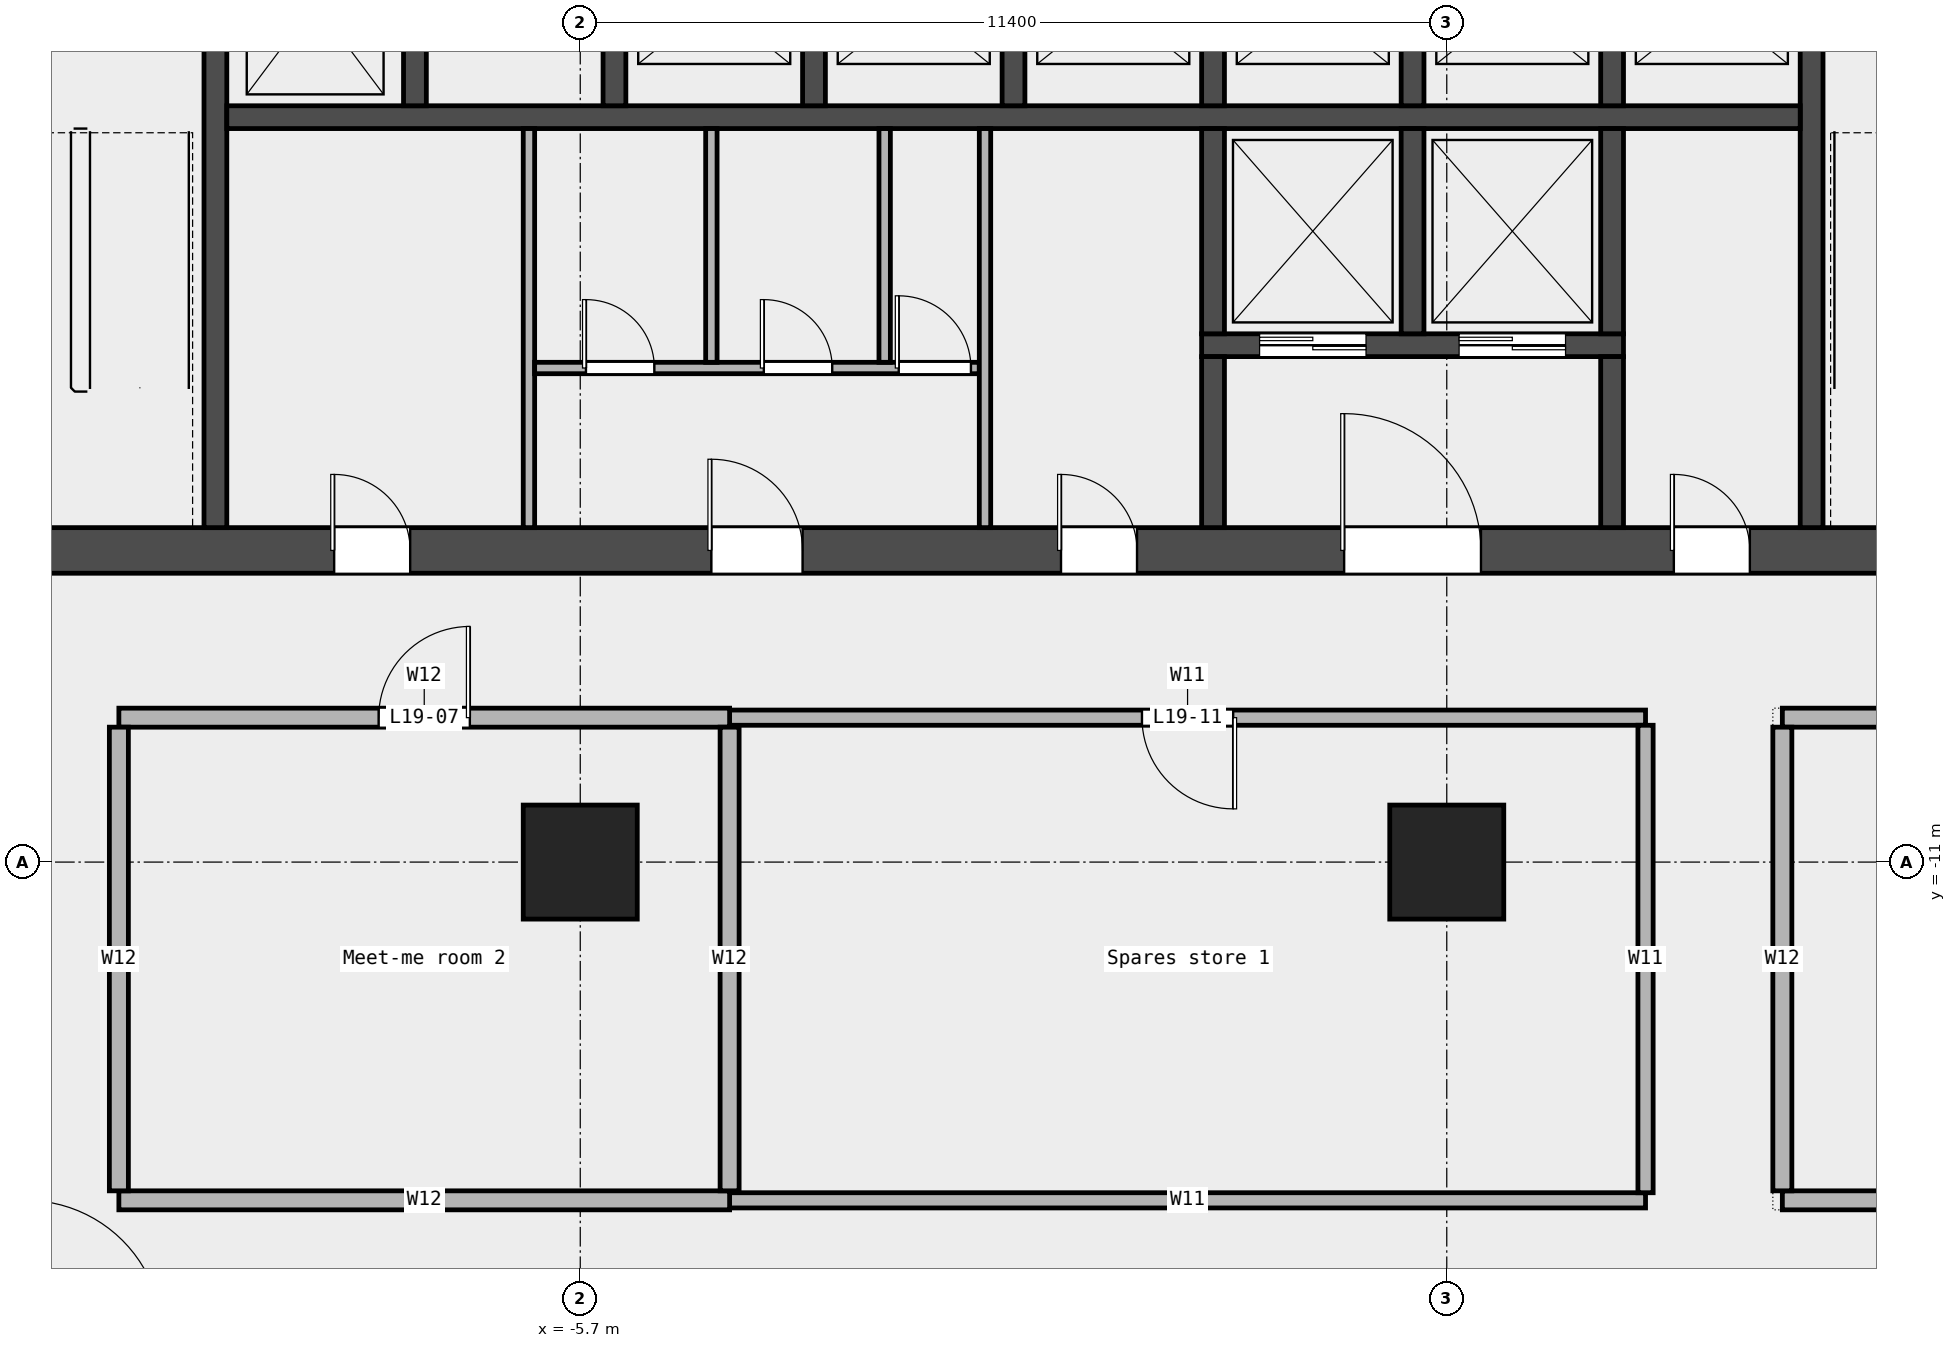
"""IFC4 building model, lengths in metres.
Left out: names, types, materials, properties, quantities, classifications, styles, units other than length and angle.
Written with IfcOpenShell. Run it as: python <this file> out.ifc"""

import sys

from ifc_helpers import new_model, si_unit, direction, frame, frame_2d, origin, origin_2d, place, context, subcontext, project, spatial, rectangle, extrude, element, fill, save


model = new_model("IFC4")
c1 = context("Model", 3, precision=1e-05, world=origin(), true_north=direction((0.0, 1.0)))
c2 = subcontext(c1, "Body", "Model", "MODEL_VIEW")
j1 = project(units=[si_unit("LENGTHUNIT", "METRE"), si_unit("PLANEANGLEUNIT", "RADIAN")], contexts=[c1])
p1 = place(None, origin())
s1 = spatial("IfcSite", under=j1, at=p1, CompositionType="ELEMENT")
p2 = place(p1, origin())
s2 = spatial("IfcBuilding", under=s1, at=p2, CompositionType="ELEMENT")
p3 = place(p2, frame((0.0, 0.0, 99.1)))
s3 = spatial("IfcBuildingStorey", under=s2, at=p3, CompositionType="ELEMENT", Elevation=99.1)
for number, where, z_axis, x_axis in (
    (1, (-5.7, -11.0, 0.0), (0.0, 0.0, 1.0), (1.0, 0.0, 0.0)),
    (2, (5.7, -11.0, 0.0), (0.0, 0.0, 1.0), (1.0, 0.0, 0.0)),
):
    element("IfcColumn", number, at=place(p3, frame(where, z_axis=z_axis, x_axis=x_axis)), inside=s3, PredefinedType="COLUMN", context=c2, shape_type="SweptSolid", body=[
        extrude(rectangle(XDim=1.5, YDim=1.5, at=origin_2d()), origin(), (0.0, 0.0, 1.0), 4.05),
    ])
p4 = place(p3, frame((-3.735, -15.45, 0.0), z_axis=(0.0, 0.0, 1.0), x_axis=(1.0, 0.0, 0.0)))
e3 = element("IfcWall", 3, at=p4, inside=s3, PredefinedType="PARTITIONING", context=c2, shape_type="SweptSolid", body=[
    extrude(rectangle(XDim=12.05, YDim=0.2, at=frame_2d((6.025, 0.0))), origin(), (0.0, 0.0, 1.0), 4.05),
])
p5 = place(p3, frame((-11.77, -15.45, 0.0), z_axis=(0.0, 0.0, 1.0), x_axis=(1.0, 0.0, 0.0)))
e4 = element("IfcWall", 4, at=p5, inside=s3, PredefinedType="PARTITIONING", context=c2, shape_type="SweptSolid", body=[
    extrude(rectangle(XDim=8.035, YDim=0.25, at=frame_2d((4.018, 0.0))), origin(), (0.0, 0.0, 1.0), 4.05),
])
p6 = place(p3, frame((10.115, -15.45, 0.0), z_axis=(0.0, 0.0, 1.0), x_axis=(1.0, 0.0, 0.0)))
e5 = element("IfcWall", 5, at=p6, inside=s3, PredefinedType="PARTITIONING", context=c2, shape_type="SweptSolid", body=[
    extrude(rectangle(XDim=18.885, YDim=0.25, at=frame_2d((9.442, 0.0))), origin(), (0.0, 0.0, 1.0), 4.05),
])
p7 = place(p6, frame((8.742, 0.0, 0.0)))
e6 = element("IfcOpeningElement", 6, at=p7, cuts=e5, PredefinedType="OPENING", context=c2, shape_type="SweptSolid", body=[
    extrude(rectangle(XDim=1.2, YDim=2.1, at=frame_2d((0.6, 1.05))), frame((0.0, 0.137, 0.0), z_axis=(0.0, -1.0, 0.0), x_axis=(1.0, 0.0, 0.0)), (0.0, 0.0, 1.0), 0.274),
])
p8 = place(p3, frame((-3.735, -9.1, 0.0), z_axis=(0.0, 0.0, 1.0), x_axis=(1.0, 0.0, 0.0)))
e7 = element("IfcWall", 7, at=p8, inside=s3, PredefinedType="PARTITIONING", context=c2, shape_type="SweptSolid", body=[
    extrude(rectangle(XDim=12.05, YDim=0.2, at=frame_2d((6.025, 0.0))), origin(), (0.0, 0.0, 1.0), 4.05),
])
p9 = place(p8, frame((5.425, 0.0, 0.0)))
e8 = element("IfcOpeningElement", 8, at=p9, cuts=e7, PredefinedType="OPENING", context=c2, shape_type="SweptSolid", body=[
    extrude(rectangle(XDim=1.2, YDim=2.1, at=frame_2d((0.6, 1.05))), frame((0.0, 0.112, 0.0), z_axis=(0.0, -1.0, 0.0), x_axis=(1.0, 0.0, 0.0)), (0.0, 0.0, 1.0), 0.224),
])
p10 = place(p3, frame((-11.77, -9.1, 0.0), z_axis=(0.0, 0.0, 1.0), x_axis=(1.0, 0.0, 0.0)))
e9 = element("IfcWall", 9, at=p10, inside=s3, PredefinedType="PARTITIONING", context=c2, shape_type="SweptSolid", body=[
    extrude(rectangle(XDim=8.035, YDim=0.25, at=frame_2d((4.018, 0.0))), origin(), (0.0, 0.0, 1.0), 4.05),
])
p11 = place(p10, frame((3.417, 0.0, 0.0)))
e10 = element("IfcOpeningElement", 10, at=p11, cuts=e9, PredefinedType="OPENING", context=c2, shape_type="SweptSolid", body=[
    extrude(rectangle(XDim=1.2, YDim=2.1, at=frame_2d((0.6, 1.05))), frame((0.0, 0.137, 0.0), z_axis=(0.0, -1.0, 0.0), x_axis=(1.0, 0.0, 0.0)), (0.0, 0.0, 1.0), 0.274),
])
p12 = place(p3, frame((10.115, -9.1, 0.0), z_axis=(0.0, 0.0, 1.0), x_axis=(1.0, 0.0, 0.0)))
e11 = element("IfcWall", 11, at=p12, inside=s3, PredefinedType="PARTITIONING", context=c2, shape_type="SweptSolid", body=[
    extrude(rectangle(XDim=18.885, YDim=0.25, at=frame_2d((9.442, 0.0))), origin(), (0.0, 0.0, 1.0), 4.05),
])
for number, where, z_axis, x_axis in (
    (12, (-11.77, -15.325, 0.0), (0.0, 0.0, 1.0), (0.0, 1.0, 0.0)),
    (13, (-3.735, -15.325, 0.0), (0.0, 0.0, 1.0), (0.0, 1.0, 0.0)),
):
    element("IfcWall", number, at=place(p3, frame(where, z_axis=z_axis, x_axis=x_axis)), inside=s3, PredefinedType="PARTITIONING", context=c2, shape_type="SweptSolid", body=[
        extrude(rectangle(XDim=6.1, YDim=0.25, at=frame_2d((3.05, 0.0))), origin(), (0.0, 0.0, 1.0), 4.05),
    ])
p13 = place(p3, frame((8.315, -15.35, 0.0), z_axis=(0.0, 0.0, 1.0), x_axis=(0.0, 1.0, 0.0)))
e14 = element("IfcWall", 14, at=p13, inside=s3, PredefinedType="PARTITIONING", context=c2, shape_type="SweptSolid", body=[
    extrude(rectangle(XDim=6.15, YDim=0.2, at=frame_2d((3.075, 0.0))), origin(), (0.0, 0.0, 1.0), 4.05),
])
p14 = place(p3, frame((10.115, -15.325, 0.0), z_axis=(0.0, 0.0, 1.0), x_axis=(0.0, 1.0, 0.0)))
e15 = element("IfcWall", 15, at=p14, inside=s3, PredefinedType="PARTITIONING", context=c2, shape_type="SweptSolid", body=[
    extrude(rectangle(XDim=6.1, YDim=0.25, at=frame_2d((3.05, 0.0))), origin(), (0.0, 0.0, 1.0), 4.05),
])
p15 = place(p3, frame((-14.4, -6.9, 0.0), z_axis=(0.0, 0.0, 1.0), x_axis=(1.0, 0.0, 0.0)))
e16 = element("IfcWall", 16, at=p15, inside=s3, PredefinedType="SHEAR", context=c2, shape_type="SweptSolid", body=[
    extrude(rectangle(XDim=28.8, YDim=0.6, at=frame_2d((14.4, 0.0))), origin(), (0.0, 0.0, 1.0), 4.2),
])
p16 = place(p15, frame((5.462, 0.0, 0.0)))
e17 = element("IfcOpeningElement", 17, at=p16, cuts=e16, PredefinedType="OPENING", context=c2, shape_type="SweptSolid", body=[
    extrude(rectangle(XDim=1.0, YDim=2.1, at=frame_2d((0.5, 1.05))), frame((0.0, 0.312, 0.0), z_axis=(0.0, -1.0, 0.0), x_axis=(1.0, 0.0, 0.0)), (0.0, 0.0, 1.0), 0.624),
])
p17 = place(p15, frame((10.425, 0.0, 0.0)))
e18 = element("IfcOpeningElement", 18, at=p17, cuts=e16, PredefinedType="OPENING", context=c2, shape_type="SweptSolid", body=[
    extrude(rectangle(XDim=1.2, YDim=2.1, at=frame_2d((0.6, 1.05))), frame((0.0, 0.312, 0.0), z_axis=(0.0, -1.0, 0.0), x_axis=(1.0, 0.0, 0.0)), (0.0, 0.0, 1.0), 0.624),
])
p18 = place(p15, frame((15.025, 0.0, 0.0)))
e19 = element("IfcOpeningElement", 19, at=p18, cuts=e16, PredefinedType="OPENING", context=c2, shape_type="SweptSolid", body=[
    extrude(rectangle(XDim=1.0, YDim=2.1, at=frame_2d((0.5, 1.05))), frame((0.0, 0.312, 0.0), z_axis=(0.0, -1.0, 0.0), x_axis=(1.0, 0.0, 0.0)), (0.0, 0.0, 1.0), 0.624),
])
p19 = place(p15, frame((18.75, 0.0, 0.0)))
e20 = element("IfcOpeningElement", 20, at=p19, cuts=e16, PredefinedType="OPENING", context=c2, shape_type="SweptSolid", body=[
    extrude(rectangle(XDim=1.8, YDim=2.1, at=frame_2d((0.9, 1.05))), frame((0.0, 0.312, 0.0), z_axis=(0.0, -1.0, 0.0), x_axis=(1.0, 0.0, 0.0)), (0.0, 0.0, 1.0), 0.624),
])
p20 = place(p15, frame((23.087, 0.0, 0.0)))
e21 = element("IfcOpeningElement", 21, at=p20, cuts=e16, PredefinedType="OPENING", context=c2, shape_type="SweptSolid", body=[
    extrude(rectangle(XDim=1.0, YDim=2.1, at=frame_2d((0.5, 1.05))), frame((0.0, 0.312, 0.0), z_axis=(0.0, -1.0, 0.0), x_axis=(1.0, 0.0, 0.0)), (0.0, 0.0, 1.0), 0.624),
])
for number, where, z_axis, x_axis in (
    (22, (-10.5, -6.6, 0.0), (0.0, 0.0, 1.0), (0.0, 1.0, 0.0)),
    (23, (10.5, -6.6, 0.0), (0.0, 0.0, 1.0), (0.0, 1.0, 0.0)),
):
    element("IfcWall", number, at=place(p3, frame(where, z_axis=z_axis, x_axis=x_axis)), inside=s3, PredefinedType="SHEAR", context=c2, shape_type="SweptSolid", body=[
        extrude(rectangle(XDim=8.55, YDim=0.3, at=frame_2d((4.275, 0.0))), origin(), (0.0, 0.0, 1.0), 4.2),
    ])
p21 = place(p3, frame((-10.35, -1.2, 0.0), z_axis=(0.0, 0.0, 1.0), x_axis=(1.0, 0.0, 0.0)))
e24 = element("IfcWall", 24, at=p21, inside=s3, PredefinedType="SOLIDWALL", context=c2, shape_type="SweptSolid", body=[
    extrude(rectangle(XDim=20.7, YDim=0.3, at=frame_2d((10.35, 0.0))), origin(), (0.0, 0.0, 1.0), 4.2),
])
for number, where, z_axis, x_axis in (
    (25, (-7.875, -1.05, 0.0), (0.0, 0.0, 1.0), (0.0, 1.0, 0.0)),
    (26, (-5.25, -1.05, 0.0), (0.0, 0.0, 1.0), (0.0, 1.0, 0.0)),
    (27, (-2.625, -1.05, 0.0), (0.0, 0.0, 1.0), (0.0, 1.0, 0.0)),
    (28, (0.0, -1.05, 0.0), (0.0, 0.0, 1.0), (0.0, 1.0, 0.0)),
    (29, (2.625, -1.05, 0.0), (0.0, 0.0, 1.0), (0.0, 1.0, 0.0)),
    (30, (5.25, -1.05, 0.0), (0.0, 0.0, 1.0), (0.0, 1.0, 0.0)),
    (31, (7.875, -1.05, 0.0), (0.0, 0.0, 1.0), (0.0, 1.0, 0.0)),
):
    element("IfcWall", number, at=place(p3, frame(where, z_axis=z_axis, x_axis=x_axis)), inside=s3, PredefinedType="SOLIDWALL", context=c2, shape_type="SweptSolid", body=[
        extrude(rectangle(XDim=2.7, YDim=0.3, at=frame_2d((1.35, 0.0))), origin(), (0.0, 0.0, 1.0), 4.2),
    ])
p22 = place(p3, frame((2.475, -4.2, 0.0), z_axis=(0.0, 0.0, 1.0), x_axis=(1.0, 0.0, 0.0)))
e32 = element("IfcWall", 32, at=p22, inside=s3, PredefinedType="SOLIDWALL", context=c2, shape_type="SweptSolid", body=[
    extrude(rectangle(XDim=5.55, YDim=0.3, at=frame_2d((2.775, 0.0))), origin(), (0.0, 0.0, 1.0), 4.2),
])
p23 = place(p22, frame((0.762, 0.0, 0.0)))
e33 = element("IfcOpeningElement", 33, at=p23, cuts=e32, PredefinedType="OPENING", context=c2, shape_type="SweptSolid", body=[
    extrude(rectangle(XDim=1.4, YDim=2.1, at=frame_2d((0.7, 1.05))), frame((0.0, 0.162, 0.0), z_axis=(0.0, -1.0, 0.0), x_axis=(1.0, 0.0, 0.0)), (0.0, 0.0, 1.0), 0.324),
])
p24 = place(p22, frame((3.387, 0.0, 0.0)))
e34 = element("IfcOpeningElement", 34, at=p24, cuts=e32, PredefinedType="OPENING", context=c2, shape_type="SweptSolid", body=[
    extrude(rectangle(XDim=1.4, YDim=2.1, at=frame_2d((0.7, 1.05))), frame((0.0, 0.162, 0.0), z_axis=(0.0, -1.0, 0.0), x_axis=(1.0, 0.0, 0.0)), (0.0, 0.0, 1.0), 0.324),
])
p25 = place(p3, frame((2.625, -4.05, 0.0), z_axis=(0.0, 0.0, 1.0), x_axis=(0.0, 1.0, 0.0)))
e35 = element("IfcWall", 35, at=p25, inside=s3, PredefinedType="SOLIDWALL", context=c2, shape_type="SweptSolid", body=[
    extrude(rectangle(XDim=2.7, YDim=0.3, at=frame_2d((1.35, 0.0))), origin(), (0.0, 0.0, 1.0), 4.2),
])
p26 = place(p3, frame((2.625, -6.6, 0.0), z_axis=(0.0, 0.0, 1.0), x_axis=(0.0, 1.0, 0.0)))
e36 = element("IfcWall", 36, at=p26, inside=s3, PredefinedType="SOLIDWALL", context=c2, shape_type="SweptSolid", body=[
    extrude(rectangle(XDim=2.25, YDim=0.3, at=frame_2d((1.125, 0.0))), origin(), (0.0, 0.0, 1.0), 4.2),
])
for number, where, z_axis, x_axis in (
    (37, (5.25, -4.05, 0.0), (0.0, 0.0, 1.0), (0.0, 1.0, 0.0)),
    (38, (7.875, -4.05, 0.0), (0.0, 0.0, 1.0), (0.0, 1.0, 0.0)),
):
    element("IfcWall", number, at=place(p3, frame(where, z_axis=z_axis, x_axis=x_axis)), inside=s3, PredefinedType="SOLIDWALL", context=c2, shape_type="SweptSolid", body=[
        extrude(rectangle(XDim=2.7, YDim=0.3, at=frame_2d((1.35, 0.0))), origin(), (0.0, 0.0, 1.0), 4.2),
    ])
p27 = place(p3, frame((7.875, -6.6, 0.0), z_axis=(0.0, 0.0, 1.0), x_axis=(0.0, 1.0, 0.0)))
e39 = element("IfcWall", 39, at=p27, inside=s3, PredefinedType="SOLIDWALL", context=c2, shape_type="SweptSolid", body=[
    extrude(rectangle(XDim=2.25, YDim=0.3, at=frame_2d((1.125, 0.0))), origin(), (0.0, 0.0, 1.0), 4.2),
])
p28 = place(p3, frame((-6.375, -6.6, 0.0), z_axis=(0.0, 0.0, 1.0), x_axis=(0.0, 1.0, 0.0)))
e40 = element("IfcWall", 40, at=p28, inside=s3, PredefinedType="PARTITIONING", context=c2, shape_type="SweptSolid", body=[
    extrude(rectangle(XDim=5.25, YDim=0.15, at=frame_2d((2.625, 0.0))), origin(), (0.0, 0.0, 1.0), 4.2),
])
p29 = place(p3, frame((-6.3, -4.5, 0.0), z_axis=(0.0, 0.0, 1.0), x_axis=(1.0, 0.0, 0.0)))
e41 = element("IfcWall", 41, at=p29, inside=s3, PredefinedType="PARTITIONING", context=c2, shape_type="SweptSolid", body=[
    extrude(rectangle(XDim=5.85, YDim=0.15, at=frame_2d((2.925, 0.0))), origin(), (0.0, 0.0, 1.0), 4.2),
])
p30 = place(p29, frame((0.675, 0.0, 0.0)))
e42 = element("IfcOpeningElement", 42, at=p30, cuts=e41, PredefinedType="OPENING", context=c2, shape_type="SweptSolid", body=[
    extrude(rectangle(XDim=0.9, YDim=2.1, at=frame_2d((0.45, 1.05))), frame((0.0, 0.087, 0.0), z_axis=(0.0, -1.0, 0.0), x_axis=(1.0, 0.0, 0.0)), (0.0, 0.0, 1.0), 0.174),
])
p31 = place(p29, frame((3.015, 0.0, 0.0)))
e43 = element("IfcOpeningElement", 43, at=p31, cuts=e41, PredefinedType="OPENING", context=c2, shape_type="SweptSolid", body=[
    extrude(rectangle(XDim=0.9, YDim=2.1, at=frame_2d((0.45, 1.05))), frame((0.0, 0.087, 0.0), z_axis=(0.0, -1.0, 0.0), x_axis=(1.0, 0.0, 0.0)), (0.0, 0.0, 1.0), 0.174),
])
p32 = place(p29, frame((4.79, 0.0, 0.0)))
e44 = element("IfcOpeningElement", 44, at=p32, cuts=e41, PredefinedType="OPENING", context=c2, shape_type="SweptSolid", body=[
    extrude(rectangle(XDim=0.95, YDim=2.1, at=frame_2d((0.475, 1.05))), frame((0.0, 0.087, 0.0), z_axis=(0.0, -1.0, 0.0), x_axis=(1.0, 0.0, 0.0)), (0.0, 0.0, 1.0), 0.174),
])
for number, where, z_axis, x_axis in (
    (45, (-3.975, -4.425, 0.0), (0.0, 0.0, 1.0), (0.0, 1.0, 0.0)),
    (46, (-1.695, -4.425, 0.0), (0.0, 0.0, 1.0), (0.0, 1.0, 0.0)),
):
    element("IfcWall", number, at=place(p3, frame(where, z_axis=z_axis, x_axis=x_axis)), inside=s3, PredefinedType="PARTITIONING", context=c2, shape_type="SweptSolid", body=[
        extrude(rectangle(XDim=3.075, YDim=0.15, at=frame_2d((1.538, 0.0))), origin(), (0.0, 0.0, 1.0), 4.2),
    ])
p33 = place(p3, frame((-0.375, -6.6, 0.0), z_axis=(0.0, 0.0, 1.0), x_axis=(0.0, 1.0, 0.0)))
e47 = element("IfcWall", 47, at=p33, inside=s3, PredefinedType="PARTITIONING", context=c2, shape_type="SweptSolid", body=[
    extrude(rectangle(XDim=5.25, YDim=0.15, at=frame_2d((2.625, 0.0))), origin(), (0.0, 0.0, 1.0), 4.2),
])
p34 = place(p11, origin())
e48 = element("IfcDoor", 48, at=p34, inside=s3, OperationType="SINGLE_SWING_RIGHT", PredefinedType="DOOR", context=c2, shape_type="SweptSolid", body=[
    extrude(rectangle(XDim=1.2, YDim=2.1, at=frame_2d((0.6, 1.05))), frame((0.0, 0.025, 0.0), z_axis=(0.0, -1.0, 0.0), x_axis=(1.0, 0.0, 0.0)), (0.0, 0.0, 1.0), 0.05),
])
fill(e10, e48)
p35 = place(p9, origin())
e49 = element("IfcDoor", 49, at=p35, inside=s3, OperationType="SINGLE_SWING_LEFT", PredefinedType="DOOR", context=c2, shape_type="SweptSolid", body=[
    extrude(rectangle(XDim=1.2, YDim=2.1, at=frame_2d((0.6, 1.05))), frame((0.0, 0.025, 0.0), z_axis=(0.0, -1.0, 0.0), x_axis=(1.0, 0.0, 0.0)), (0.0, 0.0, 1.0), 0.05),
])
fill(e8, e49)
p36 = place(p23, origin())
e50 = element("IfcDoor", 50, at=p36, inside=s3, OperationType="DOUBLE_DOOR_SLIDING", PredefinedType="DOOR", context=c2, shape_type="SweptSolid", body=[
    extrude(rectangle(XDim=1.4, YDim=2.1, at=frame_2d((0.7, 1.05))), frame((0.0, 0.025, 0.0), z_axis=(0.0, -1.0, 0.0), x_axis=(1.0, 0.0, 0.0)), (0.0, 0.0, 1.0), 0.05),
])
fill(e33, e50)
p37 = place(p24, origin())
e51 = element("IfcDoor", 51, at=p37, inside=s3, OperationType="DOUBLE_DOOR_SLIDING", PredefinedType="DOOR", context=c2, shape_type="SweptSolid", body=[
    extrude(rectangle(XDim=1.4, YDim=2.1, at=frame_2d((0.7, 1.05))), frame((0.0, 0.025, 0.0), z_axis=(0.0, -1.0, 0.0), x_axis=(1.0, 0.0, 0.0)), (0.0, 0.0, 1.0), 0.05),
])
fill(e34, e51)
p38 = place(p16, origin())
e52 = element("IfcDoor", 52, at=p38, inside=s3, OperationType="SINGLE_SWING_LEFT", PredefinedType="DOOR", context=c2, shape_type="SweptSolid", body=[
    extrude(rectangle(XDim=1.0, YDim=2.1, at=frame_2d((0.5, 1.05))), frame((0.0, 0.025, 0.0), z_axis=(0.0, -1.0, 0.0), x_axis=(1.0, 0.0, 0.0)), (0.0, 0.0, 1.0), 0.05),
])
fill(e17, e52)
p39 = place(p17, origin())
e53 = element("IfcDoor", 53, at=p39, inside=s3, OperationType="SINGLE_SWING_LEFT", PredefinedType="DOOR", context=c2, shape_type="SweptSolid", body=[
    extrude(rectangle(XDim=1.2, YDim=2.1, at=frame_2d((0.6, 1.05))), frame((0.0, 0.025, 0.0), z_axis=(0.0, -1.0, 0.0), x_axis=(1.0, 0.0, 0.0)), (0.0, 0.0, 1.0), 0.05),
])
fill(e18, e53)
p40 = place(p30, origin())
e54 = element("IfcDoor", 54, at=p40, inside=s3, OperationType="SINGLE_SWING_LEFT", PredefinedType="DOOR", context=c2, shape_type="SweptSolid", body=[
    extrude(rectangle(XDim=0.9, YDim=2.1, at=frame_2d((0.45, 1.05))), frame((0.0, 0.025, 0.0), z_axis=(0.0, -1.0, 0.0), x_axis=(1.0, 0.0, 0.0)), (0.0, 0.0, 1.0), 0.05),
])
fill(e42, e54)
p41 = place(p31, origin())
e55 = element("IfcDoor", 55, at=p41, inside=s3, OperationType="SINGLE_SWING_LEFT", PredefinedType="DOOR", context=c2, shape_type="SweptSolid", body=[
    extrude(rectangle(XDim=0.9, YDim=2.1, at=frame_2d((0.45, 1.05))), frame((0.0, 0.025, 0.0), z_axis=(0.0, -1.0, 0.0), x_axis=(1.0, 0.0, 0.0)), (0.0, 0.0, 1.0), 0.05),
])
fill(e43, e55)
p42 = place(p32, origin())
e56 = element("IfcDoor", 56, at=p42, inside=s3, OperationType="SINGLE_SWING_LEFT", PredefinedType="DOOR", context=c2, shape_type="SweptSolid", body=[
    extrude(rectangle(XDim=0.95, YDim=2.1, at=frame_2d((0.475, 1.05))), frame((0.0, 0.025, 0.0), z_axis=(0.0, -1.0, 0.0), x_axis=(1.0, 0.0, 0.0)), (0.0, 0.0, 1.0), 0.05),
])
fill(e44, e56)
p43 = place(p18, origin())
e57 = element("IfcDoor", 57, at=p43, inside=s3, OperationType="SINGLE_SWING_LEFT", PredefinedType="DOOR", context=c2, shape_type="SweptSolid", body=[
    extrude(rectangle(XDim=1.0, YDim=2.1, at=frame_2d((0.5, 1.05))), frame((0.0, 0.025, 0.0), z_axis=(0.0, -1.0, 0.0), x_axis=(1.0, 0.0, 0.0)), (0.0, 0.0, 1.0), 0.05),
])
fill(e19, e57)
p44 = place(p19, origin())
e58 = element("IfcDoor", 58, at=p44, inside=s3, OperationType="DOUBLE_DOOR_SINGLE_SWING", PredefinedType="DOOR", context=c2, shape_type="SweptSolid", body=[
    extrude(rectangle(XDim=1.8, YDim=2.1, at=frame_2d((0.9, 1.05))), frame((0.0, 0.025, 0.0), z_axis=(0.0, -1.0, 0.0), x_axis=(1.0, 0.0, 0.0)), (0.0, 0.0, 1.0), 0.05),
])
fill(e20, e58)
p45 = place(p20, origin())
e59 = element("IfcDoor", 59, at=p45, inside=s3, OperationType="SINGLE_SWING_LEFT", PredefinedType="DOOR", context=c2, shape_type="SweptSolid", body=[
    extrude(rectangle(XDim=1.0, YDim=2.1, at=frame_2d((0.5, 1.05))), frame((0.0, 0.025, 0.0), z_axis=(0.0, -1.0, 0.0), x_axis=(1.0, 0.0, 0.0)), (0.0, 0.0, 1.0), 0.05),
])
fill(e21, e59)
save(model, sys.argv[1])
